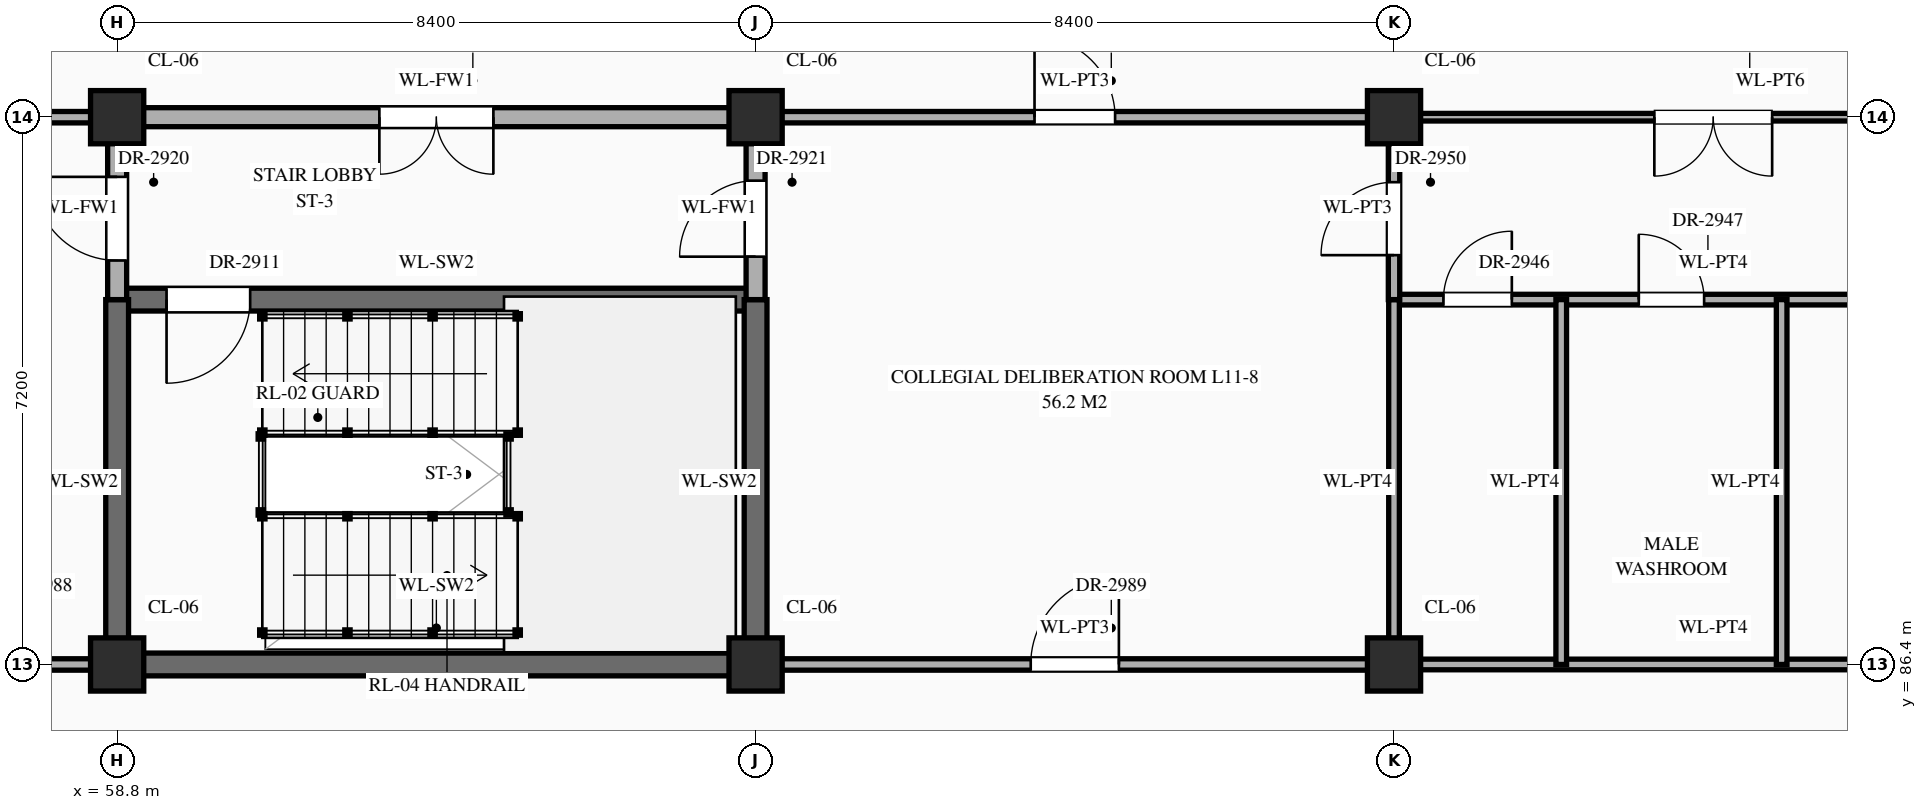
"""IFC4 building model, lengths in metres.
Left out: names, types, materials, properties, quantities, classifications, styles, units other than length and angle.
Written with IfcOpenShell. Run it as: python <this file> out.ifc"""

import sys

from ifc_helpers import new_model, si_unit, direction, frame, frame_2d, origin, origin_2d, place, context, subcontext, project, spatial, rectangle, extrude, element, fill, save


model = new_model("IFC4")
c1 = context("Model", 3, precision=1e-05, world=origin(), true_north=direction((0.0, 1.0)))
c2 = subcontext(c1, "Body", "Model", "MODEL_VIEW")
j1 = project(units=[si_unit("LENGTHUNIT", "METRE"), si_unit("PLANEANGLEUNIT", "RADIAN")], contexts=[c1])
p1 = place(None, origin())
s1 = spatial("IfcSite", under=j1, at=p1, CompositionType="ELEMENT")
p2 = place(p1, origin())
s2 = spatial("IfcBuilding", under=s1, at=p2, CompositionType="ELEMENT")
p3 = place(p2, frame((0.0, 0.0, 47.7)))
s3 = spatial("IfcBuildingStorey", under=s2, at=p3, CompositionType="ELEMENT", Elevation=47.7)
for number, where, z_axis, x_axis in (
    (1, (58.8, 86.4, 0.0), (0.0, 0.0, 1.0), (1.0, 0.0, 0.0)),
    (2, (58.8, 93.6, 0.0), (0.0, 0.0, 1.0), (1.0, 0.0, 0.0)),
    (3, (67.2, 86.4, 0.0), (0.0, 0.0, 1.0), (1.0, 0.0, 0.0)),
    (4, (67.2, 93.6, 0.0), (0.0, 0.0, 1.0), (1.0, 0.0, 0.0)),
    (5, (75.6, 86.4, 0.0), (0.0, 0.0, 1.0), (1.0, 0.0, 0.0)),
    (6, (75.6, 93.6, 0.0), (0.0, 0.0, 1.0), (1.0, 0.0, 0.0)),
):
    element("IfcColumn", number, at=place(p3, frame(where, z_axis=z_axis, x_axis=x_axis)), inside=s3, PredefinedType="COLUMN", context=c2, shape_type="SweptSolid", body=[
        extrude(rectangle(XDim=0.7, YDim=0.7, at=origin_2d()), origin(), (0.0, 0.0, 1.0), 4.2),
    ])
p4 = place(p3, frame((56.0, 86.4, 0.0), z_axis=(0.0, 0.0, 1.0), x_axis=(1.0, 0.0, 0.0)))
e7 = element("IfcWall", 7, at=p4, inside=s3, PredefinedType="STANDARD", context=c2, shape_type="SweptSolid", body=[
    extrude(rectangle(XDim=2.8, YDim=0.15, at=frame_2d((1.4, 0.0))), origin(), (0.0, 0.0, 1.0), 3.11),
])
p5 = place(p4, frame((0.705, 0.0, 0.0)))
e8 = element("IfcOpeningElement", 8, at=p5, cuts=e7, PredefinedType="OPENING", context=c2, shape_type="SweptSolid", body=[
    extrude(rectangle(XDim=1.12, YDim=2.25, at=frame_2d((0.56, 1.125))), frame((0.0, 0.087, 0.0), z_axis=(0.0, -1.0, 0.0), x_axis=(1.0, 0.0, 0.0)), (0.0, 0.0, 1.0), 0.174),
])
p6 = place(p3, frame((58.8, 86.4, 0.0), z_axis=(0.0, 0.0, 1.0), x_axis=(1.0, 0.0, 0.0)))
e9 = element("IfcWall", 9, at=p6, inside=s3, PredefinedType="SHEAR", context=c2, shape_type="SweptSolid", body=[
    extrude(rectangle(XDim=8.4, YDim=0.3, at=frame_2d((4.2, 0.0))), origin(), (0.0, 0.0, 1.0), 3.96),
])
p7 = place(p3, frame((67.2, 86.4, 0.0), z_axis=(0.0, 0.0, 1.0), x_axis=(1.0, 0.0, 0.0)))
e10 = element("IfcWall", 10, at=p7, inside=s3, PredefinedType="STANDARD", context=c2, shape_type="SweptSolid", body=[
    extrude(rectangle(XDim=8.4, YDim=0.15, at=frame_2d((4.2, 0.0))), origin(), (0.0, 0.0, 1.0), 3.11),
])
p8 = place(p7, frame((3.62, 0.0, 0.0)))
e11 = element("IfcOpeningElement", 11, at=p8, cuts=e10, PredefinedType="OPENING", context=c2, shape_type="SweptSolid", body=[
    extrude(rectangle(XDim=1.16, YDim=2.3, at=frame_2d((0.58, 1.15))), frame((0.0, 0.087, 0.0), z_axis=(0.0, -1.0, 0.0), x_axis=(1.0, 0.0, 0.0)), (0.0, 0.0, 1.0), 0.174),
])
p9 = place(p3, frame((75.6, 86.4, 0.0), z_axis=(0.0, 0.0, 1.0), x_axis=(1.0, 0.0, 0.0)))
e12 = element("IfcWall", 12, at=p9, inside=s3, PredefinedType="STANDARD", context=c2, shape_type="SweptSolid", body=[
    extrude(rectangle(XDim=8.4, YDim=0.14, at=frame_2d((4.2, 0.0))), origin(), (0.0, 0.0, 1.0), 3.11),
])
p10 = place(p3, frame((58.8, 91.2, 0.0), z_axis=(0.0, 0.0, 1.0), x_axis=(1.0, 0.0, 0.0)))
e13 = element("IfcWall", 13, at=p10, inside=s3, PredefinedType="SHEAR", context=c2, shape_type="SweptSolid", body=[
    extrude(rectangle(XDim=8.4, YDim=0.3, at=frame_2d((4.2, 0.0))), origin(), (0.0, 0.0, 1.0), 3.96),
])
p11 = place(p10, frame((0.65, 0.0, 0.0)))
e14 = element("IfcOpeningElement", 14, at=p11, cuts=e13, PredefinedType="OPENING", context=c2, shape_type="SweptSolid", body=[
    extrude(rectangle(XDim=1.1, YDim=2.2, at=frame_2d((0.55, 1.1))), frame((0.0, 0.162, 0.0), z_axis=(0.0, -1.0, 0.0), x_axis=(1.0, 0.0, 0.0)), (0.0, 0.0, 1.0), 0.324),
])
p12 = place(p3, frame((75.6, 91.2, 0.0), z_axis=(0.0, 0.0, 1.0), x_axis=(1.0, 0.0, 0.0)))
e15 = element("IfcWall", 15, at=p12, inside=s3, PredefinedType="STANDARD", context=c2, shape_type="SweptSolid", body=[
    extrude(rectangle(XDim=8.4, YDim=0.14, at=frame_2d((4.2, 0.0))), origin(), (0.0, 0.0, 1.0), 3.96),
])
p13 = place(p12, frame((0.65, 0.0, 0.0)))
e16 = element("IfcOpeningElement", 16, at=p13, cuts=e15, PredefinedType="OPENING", context=c2, shape_type="SweptSolid", body=[
    extrude(rectangle(XDim=0.9, YDim=2.15, at=frame_2d((0.45, 1.075))), frame((0.0, 0.082, 0.0), z_axis=(0.0, -1.0, 0.0), x_axis=(1.0, 0.0, 0.0)), (0.0, 0.0, 1.0), 0.164),
])
p14 = place(p12, frame((3.22, 0.0, 0.0)))
e17 = element("IfcOpeningElement", 17, at=p14, cuts=e15, PredefinedType="OPENING", context=c2, shape_type="SweptSolid", body=[
    extrude(rectangle(XDim=0.86, YDim=2.1, at=frame_2d((0.43, 1.05))), frame((0.0, 0.082, 0.0), z_axis=(0.0, -1.0, 0.0), x_axis=(1.0, 0.0, 0.0)), (0.0, 0.0, 1.0), 0.164),
])
p15 = place(p12, frame((6.32, 0.0, 0.0)))
e18 = element("IfcOpeningElement", 18, at=p15, cuts=e15, PredefinedType="OPENING", context=c2, shape_type="SweptSolid", body=[
    extrude(rectangle(XDim=0.86, YDim=2.1, at=frame_2d((0.43, 1.05))), frame((0.0, 0.082, 0.0), z_axis=(0.0, -1.0, 0.0), x_axis=(1.0, 0.0, 0.0)), (0.0, 0.0, 1.0), 0.164),
])
p16 = place(p3, frame((56.0, 93.6, 0.0), z_axis=(0.0, 0.0, 1.0), x_axis=(1.0, 0.0, 0.0)))
e19 = element("IfcWall", 19, at=p16, inside=s3, PredefinedType="STANDARD", context=c2, shape_type="SweptSolid", body=[
    extrude(rectangle(XDim=2.8, YDim=0.15, at=frame_2d((1.4, 0.0))), origin(), (0.0, 0.0, 1.0), 3.11),
])
p17 = place(p16, frame((0.755, 0.0, 0.0)))
e20 = element("IfcOpeningElement", 20, at=p17, cuts=e19, PredefinedType="OPENING", context=c2, shape_type="SweptSolid", body=[
    extrude(rectangle(XDim=1.02, YDim=2.4, at=frame_2d((0.51, 1.2))), frame((0.0, 0.087, 0.0), z_axis=(0.0, -1.0, 0.0), x_axis=(1.0, 0.0, 0.0)), (0.0, 0.0, 1.0), 0.174),
])
p18 = place(p3, frame((58.8, 93.6, 0.0), z_axis=(0.0, 0.0, 1.0), x_axis=(1.0, 0.0, 0.0)))
e21 = element("IfcWall", 21, at=p18, inside=s3, PredefinedType="STANDARD", context=c2, shape_type="SweptSolid", body=[
    extrude(rectangle(XDim=8.4, YDim=0.25, at=frame_2d((4.2, 0.0))), origin(), (0.0, 0.0, 1.0), 3.11),
])
p19 = place(p18, frame((3.45, 0.0, 0.0)))
e22 = element("IfcOpeningElement", 22, at=p19, cuts=e21, PredefinedType="OPENING", context=c2, shape_type="SweptSolid", body=[
    extrude(rectangle(XDim=1.5, YDim=2.25, at=frame_2d((0.75, 1.125))), frame((0.0, 0.137, 0.0), z_axis=(0.0, -1.0, 0.0), x_axis=(1.0, 0.0, 0.0)), (0.0, 0.0, 1.0), 0.274),
])
p20 = place(p3, frame((67.2, 93.6, 0.0), z_axis=(0.0, 0.0, 1.0), x_axis=(1.0, 0.0, 0.0)))
e23 = element("IfcWall", 23, at=p20, inside=s3, PredefinedType="STANDARD", context=c2, shape_type="SweptSolid", body=[
    extrude(rectangle(XDim=8.4, YDim=0.15, at=frame_2d((4.2, 0.0))), origin(), (0.0, 0.0, 1.0), 3.11),
])
p21 = place(p20, frame((3.67, 0.0, 0.0)))
e24 = element("IfcOpeningElement", 24, at=p21, cuts=e23, PredefinedType="OPENING", context=c2, shape_type="SweptSolid", body=[
    extrude(rectangle(XDim=1.06, YDim=2.4, at=frame_2d((0.53, 1.2))), frame((0.0, 0.087, 0.0), z_axis=(0.0, -1.0, 0.0), x_axis=(1.0, 0.0, 0.0)), (0.0, 0.0, 1.0), 0.174),
])
p22 = place(p3, frame((75.6, 93.6, 0.0), z_axis=(0.0, 0.0, 1.0), x_axis=(1.0, 0.0, 0.0)))
e25 = element("IfcWall", 25, at=p22, inside=s3, PredefinedType="STANDARD", context=c2, shape_type="SweptSolid", body=[
    extrude(rectangle(XDim=14.0, YDim=0.1, at=frame_2d((7.0, 0.0))), origin(), (0.0, 0.0, 1.0), 3.11),
])
p23 = place(p22, frame((3.425, 0.0, 0.0)))
e26 = element("IfcOpeningElement", 26, at=p23, cuts=e25, PredefinedType="OPENING", context=c2, shape_type="SweptSolid", body=[
    extrude(rectangle(XDim=1.55, YDim=2.35, at=frame_2d((0.775, 1.175))), frame((0.0, 0.062, 0.0), z_axis=(0.0, -1.0, 0.0), x_axis=(1.0, 0.0, 0.0)), (0.0, 0.0, 1.0), 0.124),
])
p24 = place(p22, frame((9.375, 0.0, 0.0)))
e27 = element("IfcOpeningElement", 27, at=p24, cuts=e25, PredefinedType="OPENING", context=c2, shape_type="SweptSolid", body=[
    extrude(rectangle(XDim=1.12, YDim=2.25, at=frame_2d((0.56, 1.125))), frame((0.0, 0.062, 0.0), z_axis=(0.0, -1.0, 0.0), x_axis=(1.0, 0.0, 0.0)), (0.0, 0.0, 1.0), 0.124),
])
p25 = place(p22, frame((12.02, 0.0, 0.0)))
e28 = element("IfcOpeningElement", 28, at=p25, cuts=e25, PredefinedType="OPENING", context=c2, shape_type="SweptSolid", body=[
    extrude(rectangle(XDim=1.16, YDim=2.3, at=frame_2d((0.58, 1.15))), frame((0.0, 0.062, 0.0), z_axis=(0.0, -1.0, 0.0), x_axis=(1.0, 0.0, 0.0)), (0.0, 0.0, 1.0), 0.124),
])
p26 = place(p3, frame((58.8, 86.4, 0.0), z_axis=(0.0, 0.0, 1.0), x_axis=(0.0, 1.0, 0.0)))
e29 = element("IfcWall", 29, at=p26, inside=s3, PredefinedType="SHEAR", context=c2, shape_type="SweptSolid", body=[
    extrude(rectangle(XDim=4.8, YDim=0.3, at=frame_2d((2.4, 0.0))), origin(), (0.0, 0.0, 1.0), 3.96),
])
p27 = place(p3, frame((58.8, 91.2, 0.0), z_axis=(0.0, 0.0, 1.0), x_axis=(0.0, 1.0, 0.0)))
e30 = element("IfcWall", 30, at=p27, inside=s3, PredefinedType="STANDARD", context=c2, shape_type="SweptSolid", body=[
    extrude(rectangle(XDim=2.4, YDim=0.25, at=frame_2d((1.2, 0.0))), origin(), (0.0, 0.0, 1.0), 3.21),
])
p28 = place(p27, frame((0.515, 0.0, 0.0)))
e31 = element("IfcOpeningElement", 31, at=p28, cuts=e30, PredefinedType="OPENING", context=c2, shape_type="SweptSolid", body=[
    extrude(rectangle(XDim=1.1, YDim=2.2, at=frame_2d((0.55, 1.1))), frame((0.0, 0.137, 0.0), z_axis=(0.0, -1.0, 0.0), x_axis=(1.0, 0.0, 0.0)), (0.0, 0.0, 1.0), 0.274),
])
p29 = place(p3, frame((67.2, 86.4, 0.0), z_axis=(0.0, 0.0, 1.0), x_axis=(0.0, 1.0, 0.0)))
e32 = element("IfcWall", 32, at=p29, inside=s3, PredefinedType="SHEAR", context=c2, shape_type="SweptSolid", body=[
    extrude(rectangle(XDim=4.8, YDim=0.3, at=frame_2d((2.4, 0.0))), origin(), (0.0, 0.0, 1.0), 3.96),
])
p30 = place(p3, frame((67.2, 91.2, 0.0), z_axis=(0.0, 0.0, 1.0), x_axis=(0.0, 1.0, 0.0)))
e33 = element("IfcWall", 33, at=p30, inside=s3, PredefinedType="STANDARD", context=c2, shape_type="SweptSolid", body=[
    extrude(rectangle(XDim=2.4, YDim=0.25, at=frame_2d((1.2, 0.0))), origin(), (0.0, 0.0, 1.0), 3.21),
])
p31 = place(p30, frame((0.565, 0.0, 0.0)))
e34 = element("IfcOpeningElement", 34, at=p31, cuts=e33, PredefinedType="OPENING", context=c2, shape_type="SweptSolid", body=[
    extrude(rectangle(XDim=1.0, YDim=2.2, at=frame_2d((0.5, 1.1))), frame((0.0, 0.137, 0.0), z_axis=(0.0, -1.0, 0.0), x_axis=(1.0, 0.0, 0.0)), (0.0, 0.0, 1.0), 0.274),
])
p32 = place(p3, frame((75.6, 86.4, 0.0), z_axis=(0.0, 0.0, 1.0), x_axis=(0.0, 1.0, 0.0)))
e35 = element("IfcWall", 35, at=p32, inside=s3, PredefinedType="STANDARD", context=c2, shape_type="SweptSolid", body=[
    extrude(rectangle(XDim=4.8, YDim=0.14, at=frame_2d((2.4, 0.0))), origin(), (0.0, 0.0, 1.0), 3.21),
])
p33 = place(p3, frame((75.6, 91.2, 0.0), z_axis=(0.0, 0.0, 1.0), x_axis=(0.0, 1.0, 0.0)))
e36 = element("IfcWall", 36, at=p33, inside=s3, PredefinedType="STANDARD", context=c2, shape_type="SweptSolid", body=[
    extrude(rectangle(XDim=2.4, YDim=0.15, at=frame_2d((1.2, 0.0))), origin(), (0.0, 0.0, 1.0), 3.21),
])
p34 = place(p33, frame((0.585, 0.0, 0.0)))
e37 = element("IfcOpeningElement", 37, at=p34, cuts=e36, PredefinedType="OPENING", context=c2, shape_type="SweptSolid", body=[
    extrude(rectangle(XDim=0.96, YDim=2.2, at=frame_2d((0.48, 1.1))), frame((0.0, 0.087, 0.0), z_axis=(0.0, -1.0, 0.0), x_axis=(1.0, 0.0, 0.0)), (0.0, 0.0, 1.0), 0.174),
])
for number, where, z_axis, x_axis in (
    (38, (77.8, 86.4, 0.0), (0.0, 0.0, 1.0), (0.0, 1.0, 0.0)),
    (39, (80.7, 86.4, 0.0), (0.0, 0.0, 1.0), (0.0, 1.0, 0.0)),
):
    element("IfcWall", number, at=place(p3, frame(where, z_axis=z_axis, x_axis=x_axis)), inside=s3, PredefinedType="STANDARD", context=c2, shape_type="SweptSolid", body=[
        extrude(rectangle(XDim=4.8, YDim=0.14, at=frame_2d((2.4, 0.0))), origin(), (0.0, 0.0, 1.0), 3.96),
    ])
p35 = place(p11, frame((1.1, 0.0, 0.0), z_axis=(0.0, 0.0, 1.0), x_axis=(-1.0, 0.0, 0.0)))
e40 = element("IfcDoor", 40, at=p35, inside=s3, OperationType="SINGLE_SWING_RIGHT", PredefinedType="DOOR", context=c2, shape_type="SweptSolid", body=[
    extrude(rectangle(XDim=1.1, YDim=2.2, at=frame_2d((0.55, 1.1))), frame((0.0, 0.025, 0.0), z_axis=(0.0, -1.0, 0.0), x_axis=(1.0, 0.0, 0.0)), (0.0, 0.0, 1.0), 0.05),
])
fill(e14, e40)
p36 = place(p19, frame((1.5, 0.0, 0.0), z_axis=(0.0, 0.0, 1.0), x_axis=(-1.0, 0.0, 0.0)))
e41 = element("IfcDoor", 41, at=p36, inside=s3, OperationType="DOUBLE_DOOR_SINGLE_SWING", PredefinedType="DOOR", context=c2, shape_type="SweptSolid", body=[
    extrude(rectangle(XDim=1.5, YDim=2.25, at=frame_2d((0.75, 1.125))), frame((0.0, 0.025, 0.0), z_axis=(0.0, -1.0, 0.0), x_axis=(1.0, 0.0, 0.0)), (0.0, 0.0, 1.0), 0.05),
])
fill(e22, e41)
p37 = place(p28, origin())
e42 = element("IfcDoor", 42, at=p37, inside=s3, OperationType="SINGLE_SWING_RIGHT", PredefinedType="DOOR", context=c2, shape_type="SweptSolid", body=[
    extrude(rectangle(XDim=1.1, YDim=2.2, at=frame_2d((0.55, 1.1))), frame((0.0, 0.025, 0.0), z_axis=(0.0, -1.0, 0.0), x_axis=(1.0, 0.0, 0.0)), (0.0, 0.0, 1.0), 0.05),
])
fill(e31, e42)
p38 = place(p31, origin())
e43 = element("IfcDoor", 43, at=p38, inside=s3, OperationType="SINGLE_SWING_LEFT", PredefinedType="DOOR", context=c2, shape_type="SweptSolid", body=[
    extrude(rectangle(XDim=1.0, YDim=2.2, at=frame_2d((0.5, 1.1))), frame((0.0, 0.025, 0.0), z_axis=(0.0, -1.0, 0.0), x_axis=(1.0, 0.0, 0.0)), (0.0, 0.0, 1.0), 0.05),
])
fill(e34, e43)
p39 = place(p13, origin())
e44 = element("IfcDoor", 44, at=p39, inside=s3, OperationType="SINGLE_SWING_RIGHT", PredefinedType="DOOR", context=c2, shape_type="SweptSolid", body=[
    extrude(rectangle(XDim=0.9, YDim=2.15, at=frame_2d((0.45, 1.075))), frame((0.0, 0.025, 0.0), z_axis=(0.0, -1.0, 0.0), x_axis=(1.0, 0.0, 0.0)), (0.0, 0.0, 1.0), 0.05),
])
fill(e16, e44)
p40 = place(p14, origin())
e45 = element("IfcDoor", 45, at=p40, inside=s3, OperationType="SINGLE_SWING_LEFT", PredefinedType="DOOR", context=c2, shape_type="SweptSolid", body=[
    extrude(rectangle(XDim=0.86, YDim=2.1, at=frame_2d((0.43, 1.05))), frame((0.0, 0.025, 0.0), z_axis=(0.0, -1.0, 0.0), x_axis=(1.0, 0.0, 0.0)), (0.0, 0.0, 1.0), 0.05),
])
fill(e17, e45)
p41 = place(p23, frame((1.55, 0.0, 0.0), z_axis=(0.0, 0.0, 1.0), x_axis=(-1.0, 0.0, 0.0)))
e46 = element("IfcDoor", 46, at=p41, inside=s3, OperationType="DOUBLE_DOOR_SINGLE_SWING", PredefinedType="DOOR", context=c2, shape_type="SweptSolid", body=[
    extrude(rectangle(XDim=1.55, YDim=2.35, at=frame_2d((0.775, 1.175))), frame((0.0, 0.025, 0.0), z_axis=(0.0, -1.0, 0.0), x_axis=(1.0, 0.0, 0.0)), (0.0, 0.0, 1.0), 0.05),
])
fill(e26, e46)
p42 = place(p34, origin())
e47 = element("IfcDoor", 47, at=p42, inside=s3, OperationType="SINGLE_SWING_LEFT", PredefinedType="DOOR", context=c2, shape_type="SweptSolid", body=[
    extrude(rectangle(XDim=0.96, YDim=2.2, at=frame_2d((0.48, 1.1))), frame((0.0, 0.025, 0.0), z_axis=(0.0, -1.0, 0.0), x_axis=(1.0, 0.0, 0.0)), (0.0, 0.0, 1.0), 0.05),
])
fill(e37, e47)
p43 = place(p21, origin())
e48 = element("IfcDoor", 48, at=p43, inside=s3, OperationType="SINGLE_SWING_LEFT", PredefinedType="DOOR", context=c2, shape_type="SweptSolid", body=[
    extrude(rectangle(XDim=1.06, YDim=2.4, at=frame_2d((0.53, 1.2))), frame((0.0, 0.025, 0.0), z_axis=(0.0, -1.0, 0.0), x_axis=(1.0, 0.0, 0.0)), (0.0, 0.0, 1.0), 0.05),
])
fill(e24, e48)
p44 = place(p8, origin())
e49 = element("IfcDoor", 49, at=p44, inside=s3, OperationType="SINGLE_SWING_RIGHT", PredefinedType="DOOR", context=c2, shape_type="SweptSolid", body=[
    extrude(rectangle(XDim=1.16, YDim=2.3, at=frame_2d((0.58, 1.15))), frame((0.0, 0.025, 0.0), z_axis=(0.0, -1.0, 0.0), x_axis=(1.0, 0.0, 0.0)), (0.0, 0.0, 1.0), 0.05),
])
fill(e11, e49)
save(model, sys.argv[1])
